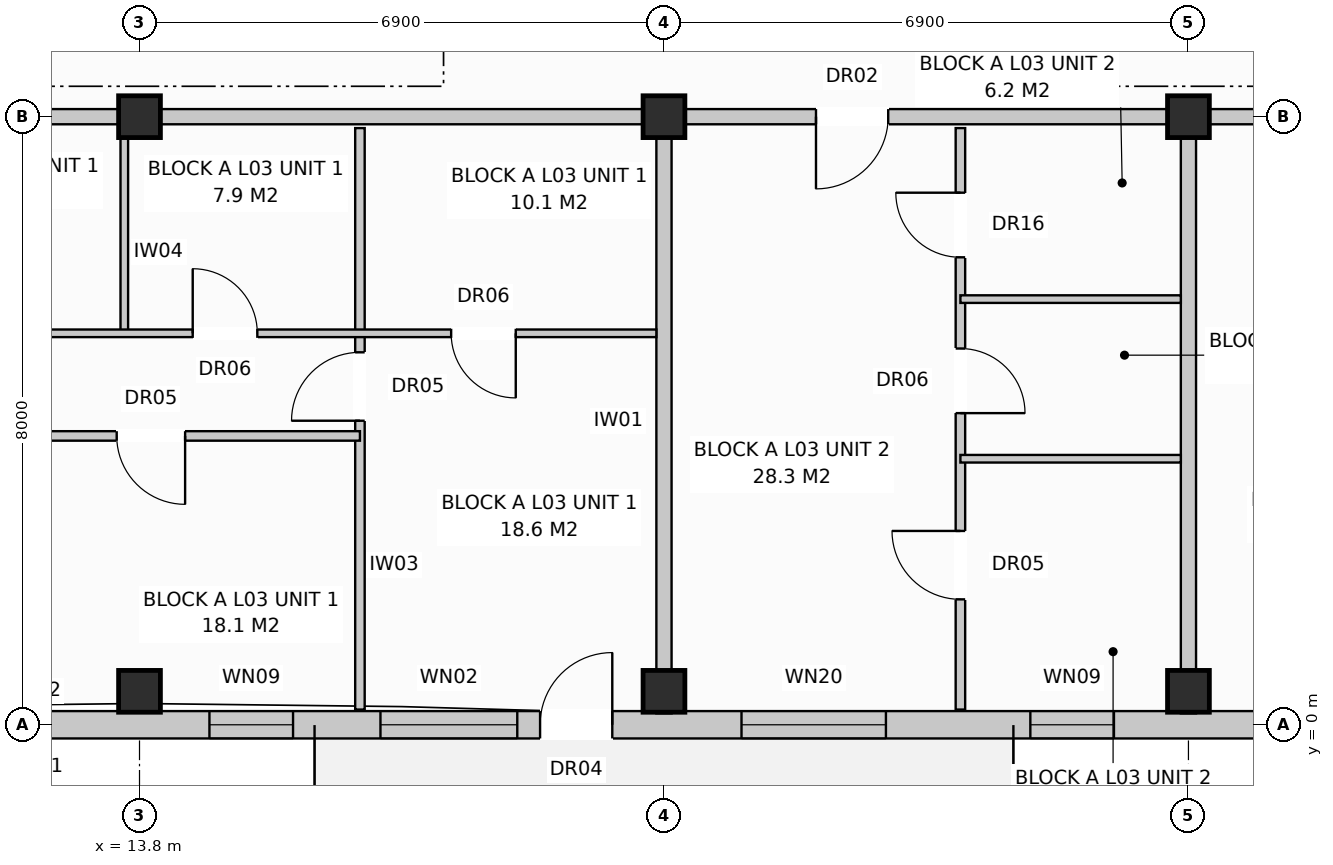
"""IFC4 building model, lengths in metres.
Left out: names, types, materials, properties, quantities, classifications, styles, units other than length and angle.
Written with IfcOpenShell. Run it as: python <this file> out.ifc"""

import sys

from ifc_helpers import new_model, si_unit, direction, frame, frame_2d, origin, origin_with_axes, origin_2d, place, context, subcontext, project, spatial, rectangle, extrude, element, fill, save


model = new_model("IFC4")
c1 = context("Model", 3, precision=1e-05, world=origin(), true_north=direction((0.0, 1.0)))
c2 = subcontext(c1, "Body", "Model", "MODEL_VIEW")
j1 = project(units=[si_unit("LENGTHUNIT", "METRE"), si_unit("PLANEANGLEUNIT", "RADIAN")], contexts=[c1])
p1 = place(None, origin())
s1 = spatial("IfcSite", under=j1, at=p1, CompositionType="ELEMENT")
p2 = place(p1, origin())
s2 = spatial("IfcBuilding", under=s1, at=p2, CompositionType="ELEMENT")
p3 = place(p2, frame((0.0, 0.0, 11.2)))
s3 = spatial("IfcBuildingStorey", under=s2, at=p3, CompositionType="ELEMENT", Elevation=11.2)
for number, where, z_axis, x_axis in (
    (1, (13.8, 0.44, 0.0), (0.0, 0.0, 1.0), (1.0, 0.0, 0.0)),
    (2, (13.8, 8.0, 0.0), (0.0, 0.0, 1.0), (1.0, 0.0, 0.0)),
    (3, (20.7, 0.44, 0.0), (0.0, 0.0, 1.0), (1.0, 0.0, 0.0)),
    (4, (20.7, 8.0, 0.0), (0.0, 0.0, 1.0), (1.0, 0.0, 0.0)),
    (5, (27.6, 0.44, 0.0), (0.0, 0.0, 1.0), (1.0, 0.0, 0.0)),
    (6, (27.6, 8.0, 0.0), (0.0, 0.0, 1.0), (1.0, 0.0, 0.0)),
):
    element("IfcColumn", number, at=place(p3, frame(where, z_axis=z_axis, x_axis=x_axis)), inside=s3, PredefinedType="COLUMN", context=c2, shape_type="SweptSolid", body=[
        extrude(rectangle(XDim=0.55, YDim=0.55, at=origin_2d()), origin(), (0.0, 0.0, 1.0), 3.2),
    ])
p4 = place(p3, frame((0.17, 0.0, 0.0), z_axis=(0.0, 0.0, 1.0), x_axis=(1.0, 0.0, 0.0)))
e7 = element("IfcWall", 7, at=p4, inside=s3, PredefinedType="STANDARD", context=c2, shape_type="SweptSolid", body=[
    extrude(rectangle(XDim=54.86, YDim=0.36, at=frame_2d((27.43, 0.0))), origin(), (0.0, 0.0, 1.0), 2.94),
])
p5 = place(p4, frame((4.903, 0.0, 0.0)))
e8 = element("IfcOpeningElement", 8, at=p5, cuts=e7, PredefinedType="OPENING", context=c2, shape_type="SweptSolid", body=[
    extrude(rectangle(XDim=0.95, YDim=2.1, at=frame_2d((0.475, 1.05))), frame((0.0, 0.192, 0.0), z_axis=(0.0, -1.0, 0.0), x_axis=(1.0, 0.0, 0.0)), (0.0, 0.0, 1.0), 0.384),
])
p6 = place(p4, frame((18.9, 0.0, 0.0)))
e9 = element("IfcOpeningElement", 9, at=p6, cuts=e7, PredefinedType="OPENING", context=c2, shape_type="SweptSolid", body=[
    extrude(rectangle(XDim=0.95, YDim=2.1, at=frame_2d((0.475, 1.05))), frame((0.0, 0.192, 0.0), z_axis=(0.0, -1.0, 0.0), x_axis=(1.0, 0.0, 0.0)), (0.0, 0.0, 1.0), 0.384),
])
p7 = place(p4, frame((31.403, 0.0, 0.0)))
e10 = element("IfcOpeningElement", 10, at=p7, cuts=e7, PredefinedType="OPENING", context=c2, shape_type="SweptSolid", body=[
    extrude(rectangle(XDim=0.95, YDim=2.1, at=frame_2d((0.475, 1.05))), frame((0.0, 0.192, 0.0), z_axis=(0.0, -1.0, 0.0), x_axis=(1.0, 0.0, 0.0)), (0.0, 0.0, 1.0), 0.384),
])
p8 = place(p4, frame((44.308, 0.0, 0.0)))
e11 = element("IfcOpeningElement", 11, at=p8, cuts=e7, PredefinedType="OPENING", context=c2, shape_type="SweptSolid", body=[
    extrude(rectangle(XDim=0.95, YDim=2.1, at=frame_2d((0.475, 1.05))), frame((0.0, 0.192, 0.0), z_axis=(0.0, -1.0, 0.0), x_axis=(1.0, 0.0, 0.0)), (0.0, 0.0, 1.0), 0.384),
])
p9 = place(p4, frame((2.1, 0.0, 0.8)))
e12 = element("IfcOpeningElement", 12, at=p9, cuts=e7, PredefinedType="OPENING", context=c2, shape_type="SweptSolid", body=[
    extrude(rectangle(XDim=1.8, YDim=1.7, at=frame_2d((0.9, 0.85))), frame((0.0, 0.192, 0.0), z_axis=(0.0, -1.0, 0.0), x_axis=(1.0, 0.0, 0.0)), (0.0, 0.0, 1.0), 0.384),
])
p10 = place(p4, frame((7.75, 0.0, 0.72)))
e13 = element("IfcOpeningElement", 13, at=p10, cuts=e7, PredefinedType="OPENING", context=c2, shape_type="SweptSolid", body=[
    extrude(rectangle(XDim=1.9, YDim=1.85, at=frame_2d((0.95, 0.925))), frame((0.0, 0.192, 0.0), z_axis=(0.0, -1.0, 0.0), x_axis=(1.0, 0.0, 0.0)), (0.0, 0.0, 1.0), 0.384),
])
p11 = place(p4, frame((14.55, 0.0, 0.72)))
e14 = element("IfcOpeningElement", 14, at=p11, cuts=e7, PredefinedType="OPENING", context=c2, shape_type="SweptSolid", body=[
    extrude(rectangle(XDim=1.1, YDim=1.5, at=frame_2d((0.55, 0.75))), frame((0.0, 0.192, 0.0), z_axis=(0.0, -1.0, 0.0), x_axis=(1.0, 0.0, 0.0)), (0.0, 0.0, 1.0), 0.384),
])
p12 = place(p4, frame((16.8, 0.0, 0.8)))
e15 = element("IfcOpeningElement", 15, at=p12, cuts=e7, PredefinedType="OPENING", context=c2, shape_type="SweptSolid", body=[
    extrude(rectangle(XDim=1.8, YDim=1.7, at=frame_2d((0.9, 0.85))), frame((0.0, 0.192, 0.0), z_axis=(0.0, -1.0, 0.0), x_axis=(1.0, 0.0, 0.0)), (0.0, 0.0, 1.0), 0.384),
])
p13 = place(p4, frame((21.55, 0.0, 0.72)))
e16 = element("IfcOpeningElement", 16, at=p13, cuts=e7, PredefinedType="OPENING", context=c2, shape_type="SweptSolid", body=[
    extrude(rectangle(XDim=1.9, YDim=1.85, at=frame_2d((0.95, 0.925))), frame((0.0, 0.192, 0.0), z_axis=(0.0, -1.0, 0.0), x_axis=(1.0, 0.0, 0.0)), (0.0, 0.0, 1.0), 0.384),
])
p14 = place(p4, frame((25.35, 0.0, 0.72)))
e17 = element("IfcOpeningElement", 17, at=p14, cuts=e7, PredefinedType="OPENING", context=c2, shape_type="SweptSolid", body=[
    extrude(rectangle(XDim=1.1, YDim=1.5, at=frame_2d((0.55, 0.75))), frame((0.0, 0.192, 0.0), z_axis=(0.0, -1.0, 0.0), x_axis=(1.0, 0.0, 0.0)), (0.0, 0.0, 1.0), 0.384),
])
p15 = place(p4, frame((29.55, 0.0, 0.72)))
e18 = element("IfcOpeningElement", 18, at=p15, cuts=e7, PredefinedType="OPENING", context=c2, shape_type="SweptSolid", body=[
    extrude(rectangle(XDim=1.1, YDim=1.5, at=frame_2d((0.55, 0.75))), frame((0.0, 0.192, 0.0), z_axis=(0.0, -1.0, 0.0), x_axis=(1.0, 0.0, 0.0)), (0.0, 0.0, 1.0), 0.384),
])
p16 = place(p4, frame((34.833, 0.0, 0.72)))
e19 = element("IfcOpeningElement", 19, at=p16, cuts=e7, PredefinedType="OPENING", context=c2, shape_type="SweptSolid", body=[
    extrude(rectangle(XDim=1.9, YDim=1.85, at=frame_2d((0.95, 0.925))), frame((0.0, 0.192, 0.0), z_axis=(0.0, -1.0, 0.0), x_axis=(1.0, 0.0, 0.0)), (0.0, 0.0, 1.0), 0.384),
])
p17 = place(p4, frame((38.45, 0.0, 0.72)))
e20 = element("IfcOpeningElement", 20, at=p17, cuts=e7, PredefinedType="OPENING", context=c2, shape_type="SweptSolid", body=[
    extrude(rectangle(XDim=1.1, YDim=1.5, at=frame_2d((0.55, 0.75))), frame((0.0, 0.192, 0.0), z_axis=(0.0, -1.0, 0.0), x_axis=(1.0, 0.0, 0.0)), (0.0, 0.0, 1.0), 0.384),
])
p18 = place(p4, frame((42.55, 0.0, 0.72)))
e21 = element("IfcOpeningElement", 21, at=p18, cuts=e7, PredefinedType="OPENING", context=c2, shape_type="SweptSolid", body=[
    extrude(rectangle(XDim=1.1, YDim=1.5, at=frame_2d((0.55, 0.75))), frame((0.0, 0.192, 0.0), z_axis=(0.0, -1.0, 0.0), x_axis=(1.0, 0.0, 0.0)), (0.0, 0.0, 1.0), 0.384),
])
p19 = place(p4, frame((45.75, 0.0, 0.72)))
e22 = element("IfcOpeningElement", 22, at=p19, cuts=e7, PredefinedType="OPENING", context=c2, shape_type="SweptSolid", body=[
    extrude(rectangle(XDim=1.9, YDim=1.85, at=frame_2d((0.95, 0.925))), frame((0.0, 0.192, 0.0), z_axis=(0.0, -1.0, 0.0), x_axis=(1.0, 0.0, 0.0)), (0.0, 0.0, 1.0), 0.384),
])
p20 = place(p4, frame((49.125, 0.0, 0.8)))
e23 = element("IfcOpeningElement", 23, at=p20, cuts=e7, PredefinedType="OPENING", context=c2, shape_type="SweptSolid", body=[
    extrude(rectangle(XDim=1.95, YDim=1.65, at=frame_2d((0.975, 0.825))), frame((0.0, 0.192, 0.0), z_axis=(0.0, -1.0, 0.0), x_axis=(1.0, 0.0, 0.0)), (0.0, 0.0, 1.0), 0.384),
])
p21 = place(p4, frame((52.95, 0.0, 0.72)))
e24 = element("IfcOpeningElement", 24, at=p21, cuts=e7, PredefinedType="OPENING", context=c2, shape_type="SweptSolid", body=[
    extrude(rectangle(XDim=1.1, YDim=1.5, at=frame_2d((0.55, 0.75))), frame((0.0, 0.192, 0.0), z_axis=(0.0, -1.0, 0.0), x_axis=(1.0, 0.0, 0.0)), (0.0, 0.0, 1.0), 0.384),
])
p22 = place(p3, frame((20.7, 7.85, 0.0), z_axis=(0.0, 0.0, 1.0), x_axis=(0.0, -1.0, 0.0)))
e25 = element("IfcWall", 25, at=p22, inside=s3, PredefinedType="PARTITIONING", context=c2, shape_type="SweptSolid", body=[
    extrude(rectangle(XDim=7.7, YDim=0.2, at=frame_2d((3.85, 0.0))), origin(), (0.0, 0.0, 1.0), 2.94),
])
p23 = place(p3, frame((0.0, 8.0, 0.0), z_axis=(0.0, 0.0, 1.0), x_axis=(1.0, 0.0, 0.0)))
e26 = element("IfcWall", 26, at=p23, inside=s3, PredefinedType="PARTITIONING", context=c2, shape_type="SweptSolid", body=[
    extrude(rectangle(XDim=20.7, YDim=0.2, at=frame_2d((10.35, 0.0))), origin(), (0.0, 0.0, 1.0), 2.38),
])
p24 = place(p23, frame((2.4, 0.0, 0.0)))
e27 = element("IfcOpeningElement", 27, at=p24, cuts=e26, PredefinedType="OPENING", context=c2, shape_type="SweptSolid", body=[
    extrude(rectangle(XDim=0.95, YDim=2.15, at=frame_2d((0.475, 1.075))), frame((0.0, 0.112, 0.0), z_axis=(0.0, -1.0, 0.0), x_axis=(1.0, 0.0, 0.0)), (0.0, 0.0, 1.0), 0.224),
])
p25 = place(p3, frame((13.6, 7.85, 0.0), z_axis=(0.0, 0.0, 1.0), x_axis=(0.0, -1.0, 0.0)))
e28 = element("IfcWall", 28, at=p25, inside=s3, PredefinedType="PARTITIONING", context=c2, shape_type="SweptSolid", body=[
    extrude(rectangle(XDim=2.7, YDim=0.1, at=frame_2d((1.35, 0.0))), origin(), (0.0, 0.0, 1.0), 2.94),
])
p26 = place(p3, frame((16.7, 7.85, 0.0), z_axis=(0.0, 0.0, 1.0), x_axis=(0.0, -1.0, 0.0)))
e29 = element("IfcWall", 29, at=p26, inside=s3, PredefinedType="PARTITIONING", context=c2, shape_type="SweptSolid", body=[
    extrude(rectangle(XDim=7.65, YDim=0.125, at=frame_2d((3.825, 0.0))), origin(), (0.0, 0.0, 1.0), 2.94),
])
p27 = place(p26, frame((2.95, 0.0, 0.0)))
e30 = element("IfcOpeningElement", 30, at=p27, cuts=e29, PredefinedType="OPENING", context=c2, shape_type="SweptSolid", body=[
    extrude(rectangle(XDim=0.9, YDim=2.1, at=frame_2d((0.45, 1.05))), frame((0.0, 0.074, 0.0), z_axis=(0.0, -1.0, 0.0), x_axis=(1.0, 0.0, 0.0)), (0.0, 0.0, 1.0), 0.149),
])
p28 = place(p3, frame((6.3, 5.15, 0.0), z_axis=(0.0, 0.0, 1.0), x_axis=(1.0, 0.0, 0.0)))
e31 = element("IfcWall", 31, at=p28, inside=s3, PredefinedType="PARTITIONING", context=c2, shape_type="SweptSolid", body=[
    extrude(rectangle(XDim=14.3, YDim=0.1, at=frame_2d((7.15, 0.0))), origin(), (0.0, 0.0, 1.0), 2.94),
])
p29 = place(p28, frame((1.6, 0.0, 0.0)))
e32 = element("IfcOpeningElement", 32, at=p29, cuts=e31, PredefinedType="OPENING", context=c2, shape_type="SweptSolid", body=[
    extrude(rectangle(XDim=0.9, YDim=2.1, at=frame_2d((0.45, 1.05))), frame((0.0, 0.062, 0.0), z_axis=(0.0, -1.0, 0.0), x_axis=(1.0, 0.0, 0.0)), (0.0, 0.0, 1.0), 0.124),
])
p30 = place(p28, frame((5.1, 0.0, 0.0)))
e33 = element("IfcOpeningElement", 33, at=p30, cuts=e31, PredefinedType="OPENING", context=c2, shape_type="SweptSolid", body=[
    extrude(rectangle(XDim=0.85, YDim=2.05, at=frame_2d((0.425, 1.025))), frame((0.0, 0.062, 0.0), z_axis=(0.0, -1.0, 0.0), x_axis=(1.0, 0.0, 0.0)), (0.0, 0.0, 1.0), 0.124),
])
p31 = place(p28, frame((8.2, 0.0, 0.0)))
e34 = element("IfcOpeningElement", 34, at=p31, cuts=e31, PredefinedType="OPENING", context=c2, shape_type="SweptSolid", body=[
    extrude(rectangle(XDim=0.85, YDim=2.05, at=frame_2d((0.425, 1.025))), frame((0.0, 0.062, 0.0), z_axis=(0.0, -1.0, 0.0), x_axis=(1.0, 0.0, 0.0)), (0.0, 0.0, 1.0), 0.124),
])
p32 = place(p28, frame((11.6, 0.0, 0.0)))
e35 = element("IfcOpeningElement", 35, at=p32, cuts=e31, PredefinedType="OPENING", context=c2, shape_type="SweptSolid", body=[
    extrude(rectangle(XDim=0.85, YDim=2.05, at=frame_2d((0.425, 1.025))), frame((0.0, 0.062, 0.0), z_axis=(0.0, -1.0, 0.0), x_axis=(1.0, 0.0, 0.0)), (0.0, 0.0, 1.0), 0.124),
])
p33 = place(p3, frame((6.3, 3.8, 0.0), z_axis=(0.0, 0.0, 1.0), x_axis=(1.0, 0.0, 0.0)))
e36 = element("IfcWall", 36, at=p33, inside=s3, PredefinedType="PARTITIONING", context=c2, shape_type="SweptSolid", body=[
    extrude(rectangle(XDim=10.4, YDim=0.125, at=frame_2d((5.2, 0.0))), origin(), (0.0, 0.0, 1.0), 2.94),
])
p34 = place(p33, frame((2.0, 0.0, 0.0)))
e37 = element("IfcOpeningElement", 37, at=p34, cuts=e36, PredefinedType="OPENING", context=c2, shape_type="SweptSolid", body=[
    extrude(rectangle(XDim=0.9, YDim=2.1, at=frame_2d((0.45, 1.05))), frame((0.0, 0.074, 0.0), z_axis=(0.0, -1.0, 0.0), x_axis=(1.0, 0.0, 0.0)), (0.0, 0.0, 1.0), 0.149),
])
p35 = place(p33, frame((7.2, 0.0, 0.0)))
e38 = element("IfcOpeningElement", 38, at=p35, cuts=e36, PredefinedType="OPENING", context=c2, shape_type="SweptSolid", body=[
    extrude(rectangle(XDim=0.9, YDim=2.1, at=frame_2d((0.45, 1.05))), frame((0.0, 0.074, 0.0), z_axis=(0.0, -1.0, 0.0), x_axis=(1.0, 0.0, 0.0)), (0.0, 0.0, 1.0), 0.149),
])
p36 = place(p3, frame((27.6, 7.85, 0.0), z_axis=(0.0, 0.0, 1.0), x_axis=(0.0, -1.0, 0.0)))
e39 = element("IfcWall", 39, at=p36, inside=s3, PredefinedType="PARTITIONING", context=c2, shape_type="SweptSolid", body=[
    extrude(rectangle(XDim=7.7, YDim=0.2, at=frame_2d((3.85, 0.0))), origin(), (0.0, 0.0, 1.0), 2.94),
])
p37 = place(p3, frame((20.7, 8.0, 0.0), z_axis=(0.0, 0.0, 1.0), x_axis=(1.0, 0.0, 0.0)))
e40 = element("IfcWall", 40, at=p37, inside=s3, PredefinedType="PARTITIONING", context=c2, shape_type="SweptSolid", body=[
    extrude(rectangle(XDim=6.9, YDim=0.2, at=frame_2d((3.45, 0.0))), origin(), (0.0, 0.0, 1.0), 2.38),
])
p38 = place(p37, frame((2.0, 0.0, 0.0)))
e41 = element("IfcOpeningElement", 41, at=p38, cuts=e40, PredefinedType="OPENING", context=c2, shape_type="SweptSolid", body=[
    extrude(rectangle(XDim=0.95, YDim=2.15, at=frame_2d((0.475, 1.075))), frame((0.0, 0.112, 0.0), z_axis=(0.0, -1.0, 0.0), x_axis=(1.0, 0.0, 0.0)), (0.0, 0.0, 1.0), 0.224),
])
p39 = place(p3, frame((24.6, 7.85, 0.0), z_axis=(0.0, 0.0, 1.0), x_axis=(0.0, -1.0, 0.0)))
e42 = element("IfcWall", 42, at=p39, inside=s3, PredefinedType="PARTITIONING", context=c2, shape_type="SweptSolid", body=[
    extrude(rectangle(XDim=7.65, YDim=0.125, at=frame_2d((3.825, 0.0))), origin(), (0.0, 0.0, 1.0), 2.94),
])
p40 = place(p39, frame((0.85, 0.0, 0.0)))
e43 = element("IfcOpeningElement", 43, at=p40, cuts=e42, PredefinedType="OPENING", context=c2, shape_type="SweptSolid", body=[
    extrude(rectangle(XDim=0.85, YDim=2.1, at=frame_2d((0.425, 1.05))), frame((0.0, 0.074, 0.0), z_axis=(0.0, -1.0, 0.0), x_axis=(1.0, 0.0, 0.0)), (0.0, 0.0, 1.0), 0.149),
])
p41 = place(p39, frame((2.9, 0.0, 0.0)))
e44 = element("IfcOpeningElement", 44, at=p41, cuts=e42, PredefinedType="OPENING", context=c2, shape_type="SweptSolid", body=[
    extrude(rectangle(XDim=0.85, YDim=2.05, at=frame_2d((0.425, 1.025))), frame((0.0, 0.074, 0.0), z_axis=(0.0, -1.0, 0.0), x_axis=(1.0, 0.0, 0.0)), (0.0, 0.0, 1.0), 0.149),
])
p42 = place(p39, frame((5.3, 0.0, 0.0)))
e45 = element("IfcOpeningElement", 45, at=p42, cuts=e42, PredefinedType="OPENING", context=c2, shape_type="SweptSolid", body=[
    extrude(rectangle(XDim=0.9, YDim=2.1, at=frame_2d((0.45, 1.05))), frame((0.0, 0.074, 0.0), z_axis=(0.0, -1.0, 0.0), x_axis=(1.0, 0.0, 0.0)), (0.0, 0.0, 1.0), 0.149),
])
for number, where, z_axis, x_axis in (
    (46, (24.6, 5.6, 0.0), (0.0, 0.0, 1.0), (1.0, 0.0, 0.0)),
    (47, (24.6, 3.5, 0.0), (0.0, 0.0, 1.0), (1.0, 0.0, 0.0)),
):
    element("IfcWall", number, at=place(p3, frame(where, z_axis=z_axis, x_axis=x_axis)), inside=s3, PredefinedType="PARTITIONING", context=c2, shape_type="SweptSolid", body=[
        extrude(rectangle(XDim=2.9, YDim=0.1, at=frame_2d((1.45, 0.0))), origin(), (0.0, 0.0, 1.0), 2.94),
    ])
p43 = place(p3, frame((27.6, 8.0, 0.0), z_axis=(0.0, 0.0, 1.0), x_axis=(1.0, 0.0, 0.0)))
e48 = element("IfcWall", 48, at=p43, inside=s3, PredefinedType="PARTITIONING", context=c2, shape_type="SweptSolid", body=[
    extrude(rectangle(XDim=13.8, YDim=0.2, at=frame_2d((6.9, 0.0))), origin(), (0.0, 0.0, 1.0), 2.38),
])
p44 = place(p43, frame((2.4, 0.0, 0.0)))
e49 = element("IfcOpeningElement", 49, at=p44, cuts=e48, PredefinedType="OPENING", context=c2, shape_type="SweptSolid", body=[
    extrude(rectangle(XDim=0.95, YDim=2.15, at=frame_2d((0.475, 1.075))), frame((0.0, 0.112, 0.0), z_axis=(0.0, -1.0, 0.0), x_axis=(1.0, 0.0, 0.0)), (0.0, 0.0, 1.0), 0.224),
])
p45 = place(p6, origin_with_axes())
e50 = element("IfcDoor", 50, at=p45, inside=s3, OperationType="SINGLE_SWING_RIGHT", PredefinedType="DOOR", context=c2, shape_type="SweptSolid", body=[
    extrude(rectangle(XDim=0.95, YDim=2.1, at=frame_2d((0.475, 1.05))), frame((0.0, 0.025, 0.0), z_axis=(0.0, -1.0, 0.0), x_axis=(1.0, 0.0, 0.0)), (0.0, 0.0, 1.0), 0.05),
])
fill(e9, e50)
p46 = place(p11, origin_with_axes())
e51 = element("IfcWindow", 51, at=p46, inside=s3, PartitioningType="SINGLE_PANEL", PredefinedType="WINDOW", context=c2, shape_type="SweptSolid", body=[
    extrude(rectangle(XDim=1.1, YDim=1.5, at=frame_2d((0.55, 0.75))), frame((0.0, 0.03, 0.0), z_axis=(0.0, -1.0, 0.0), x_axis=(1.0, 0.0, 0.0)), (0.0, 0.0, 1.0), 0.06),
])
fill(e14, e51)
p47 = place(p12, origin_with_axes())
e52 = element("IfcWindow", 52, at=p47, inside=s3, PartitioningType="SINGLE_PANEL", PredefinedType="WINDOW", context=c2, shape_type="SweptSolid", body=[
    extrude(rectangle(XDim=1.8, YDim=1.7, at=frame_2d((0.9, 0.85))), frame((0.0, 0.03, 0.0), z_axis=(0.0, -1.0, 0.0), x_axis=(1.0, 0.0, 0.0)), (0.0, 0.0, 1.0), 0.06),
])
fill(e15, e52)
p48 = place(p13, origin_with_axes())
e53 = element("IfcWindow", 53, at=p48, inside=s3, PartitioningType="SINGLE_PANEL", PredefinedType="WINDOW", context=c2, shape_type="SweptSolid", body=[
    extrude(rectangle(XDim=1.9, YDim=1.85, at=frame_2d((0.95, 0.925))), frame((0.0, 0.03, 0.0), z_axis=(0.0, -1.0, 0.0), x_axis=(1.0, 0.0, 0.0)), (0.0, 0.0, 1.0), 0.06),
])
fill(e16, e53)
p49 = place(p14, origin_with_axes())
e54 = element("IfcWindow", 54, at=p49, inside=s3, PartitioningType="SINGLE_PANEL", PredefinedType="WINDOW", context=c2, shape_type="SweptSolid", body=[
    extrude(rectangle(XDim=1.1, YDim=1.5, at=frame_2d((0.55, 0.75))), frame((0.0, 0.03, 0.0), z_axis=(0.0, -1.0, 0.0), x_axis=(1.0, 0.0, 0.0)), (0.0, 0.0, 1.0), 0.06),
])
fill(e17, e54)
p50 = place(p27, frame((0.9, 0.0, 0.0), z_axis=(0.0, 0.0, 1.0), x_axis=(-1.0, 0.0, 0.0)))
e55 = element("IfcDoor", 55, at=p50, inside=s3, OperationType="SINGLE_SWING_RIGHT", PredefinedType="DOOR", context=c2, shape_type="SweptSolid", body=[
    extrude(rectangle(XDim=0.9, YDim=2.1, at=frame_2d((0.45, 1.05))), frame((0.0, 0.025, 0.0), z_axis=(0.0, -1.0, 0.0), x_axis=(1.0, 0.0, 0.0)), (0.0, 0.0, 1.0), 0.05),
])
fill(e30, e55)
p51 = place(p31, origin_with_axes())
e56 = element("IfcDoor", 56, at=p51, inside=s3, OperationType="SINGLE_SWING_LEFT", PredefinedType="DOOR", context=c2, shape_type="SweptSolid", body=[
    extrude(rectangle(XDim=0.85, YDim=2.05, at=frame_2d((0.425, 1.025))), frame((0.0, 0.025, 0.0), z_axis=(0.0, -1.0, 0.0), x_axis=(1.0, 0.0, 0.0)), (0.0, 0.0, 1.0), 0.05),
])
fill(e34, e56)
p52 = place(p32, frame((0.85, 0.0, 0.0), z_axis=(0.0, 0.0, 1.0), x_axis=(-1.0, 0.0, 0.0)))
e57 = element("IfcDoor", 57, at=p52, inside=s3, OperationType="SINGLE_SWING_RIGHT", PredefinedType="DOOR", context=c2, shape_type="SweptSolid", body=[
    extrude(rectangle(XDim=0.85, YDim=2.05, at=frame_2d((0.425, 1.025))), frame((0.0, 0.025, 0.0), z_axis=(0.0, -1.0, 0.0), x_axis=(1.0, 0.0, 0.0)), (0.0, 0.0, 1.0), 0.05),
])
fill(e35, e57)
p53 = place(p35, frame((0.9, 0.0, 0.0), z_axis=(0.0, 0.0, 1.0), x_axis=(-1.0, 0.0, 0.0)))
e58 = element("IfcDoor", 58, at=p53, inside=s3, OperationType="SINGLE_SWING_RIGHT", PredefinedType="DOOR", context=c2, shape_type="SweptSolid", body=[
    extrude(rectangle(XDim=0.9, YDim=2.1, at=frame_2d((0.45, 1.05))), frame((0.0, 0.025, 0.0), z_axis=(0.0, -1.0, 0.0), x_axis=(1.0, 0.0, 0.0)), (0.0, 0.0, 1.0), 0.05),
])
fill(e38, e58)
p54 = place(p38, frame((0.95, 0.0, 0.0), z_axis=(0.0, 0.0, 1.0), x_axis=(-1.0, 0.0, 0.0)))
e59 = element("IfcDoor", 59, at=p54, inside=s3, OperationType="SINGLE_SWING_LEFT", PredefinedType="DOOR", context=c2, shape_type="SweptSolid", body=[
    extrude(rectangle(XDim=0.95, YDim=2.15, at=frame_2d((0.475, 1.075))), frame((0.0, 0.025, 0.0), z_axis=(0.0, -1.0, 0.0), x_axis=(1.0, 0.0, 0.0)), (0.0, 0.0, 1.0), 0.05),
])
fill(e41, e59)
p55 = place(p40, frame((0.85, 0.0, 0.0), z_axis=(0.0, 0.0, 1.0), x_axis=(-1.0, 0.0, 0.0)))
e60 = element("IfcDoor", 60, at=p55, inside=s3, OperationType="SINGLE_SWING_LEFT", PredefinedType="DOOR", context=c2, shape_type="SweptSolid", body=[
    extrude(rectangle(XDim=0.85, YDim=2.1, at=frame_2d((0.425, 1.05))), frame((0.0, 0.025, 0.0), z_axis=(0.0, -1.0, 0.0), x_axis=(1.0, 0.0, 0.0)), (0.0, 0.0, 1.0), 0.05),
])
fill(e43, e60)
p56 = place(p41, origin_with_axes())
e61 = element("IfcDoor", 61, at=p56, inside=s3, OperationType="SINGLE_SWING_RIGHT", PredefinedType="DOOR", context=c2, shape_type="SweptSolid", body=[
    extrude(rectangle(XDim=0.85, YDim=2.05, at=frame_2d((0.425, 1.025))), frame((0.0, 0.025, 0.0), z_axis=(0.0, -1.0, 0.0), x_axis=(1.0, 0.0, 0.0)), (0.0, 0.0, 1.0), 0.05),
])
fill(e44, e61)
p57 = place(p42, frame((0.9, 0.0, 0.0), z_axis=(0.0, 0.0, 1.0), x_axis=(-1.0, 0.0, 0.0)))
e62 = element("IfcDoor", 62, at=p57, inside=s3, OperationType="SINGLE_SWING_LEFT", PredefinedType="DOOR", context=c2, shape_type="SweptSolid", body=[
    extrude(rectangle(XDim=0.9, YDim=2.1, at=frame_2d((0.45, 1.05))), frame((0.0, 0.025, 0.0), z_axis=(0.0, -1.0, 0.0), x_axis=(1.0, 0.0, 0.0)), (0.0, 0.0, 1.0), 0.05),
])
fill(e45, e62)
save(model, sys.argv[1])
